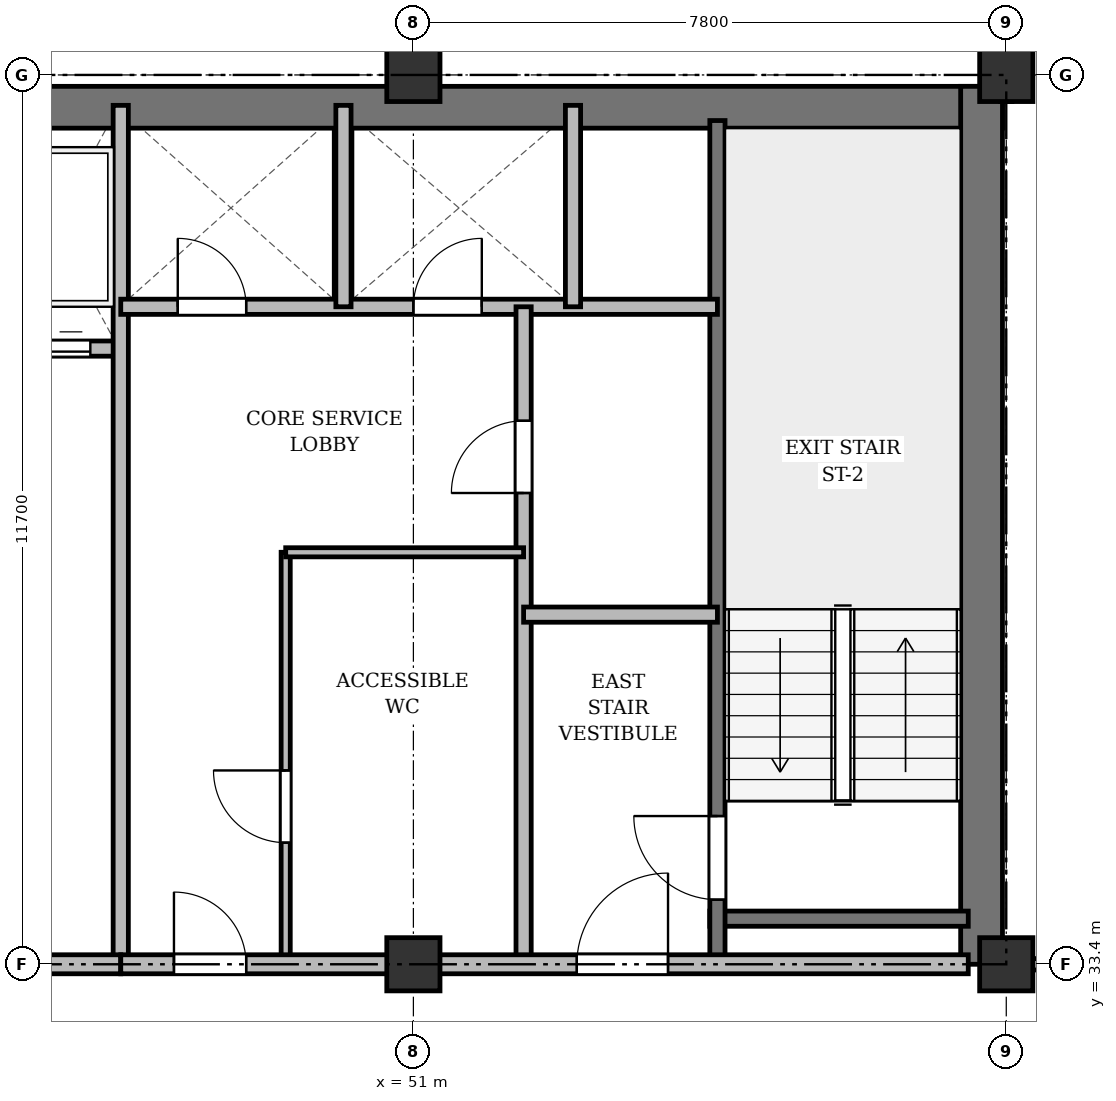
"""IFC4 building model, lengths in metres.
Left out: names, types, materials, properties, quantities, classifications, styles, units other than length and angle.
Written with IfcOpenShell. Run it as: python <this file> out.ifc"""

import sys

from ifc_helpers import new_model, si_unit, direction, frame, frame_2d, origin, origin_2d, place, context, subcontext, project, spatial, rectangle, extrude, source, transform, mapped, element, fill, save


model = new_model("IFC4")
c1 = context("Model", 3, precision=1e-05, world=origin(), true_north=direction((0.0, 1.0)))
c2 = subcontext(c1, "Body", "Model", "MODEL_VIEW")
j1 = project(units=[si_unit("LENGTHUNIT", "METRE"), si_unit("PLANEANGLEUNIT", "RADIAN")], contexts=[c1])
p1 = place(None, origin())
s1 = spatial("IfcSite", under=j1, at=p1, CompositionType="ELEMENT")
p2 = place(p1, origin())
s2 = spatial("IfcBuilding", under=s1, at=p2, CompositionType="ELEMENT")
p3 = place(p2, frame((0.0, 0.0, 215.7)))
s3 = spatial("IfcBuildingStorey", under=s2, at=p3, CompositionType="ELEMENT", Elevation=215.7)
m1 = source(origin(), c2, "Body", "SweptSolid", [
    extrude(rectangle(XDim=0.7, YDim=0.7, at=origin_2d()), origin(), (0.0, 0.0, 1.0), 3.6),
])
for number, where, z_axis, x_axis in (
    (1, (51.0, 33.4, 0.0), (0.0, 0.0, 1.0), (1.0, 0.0, 0.0)),
    (2, (51.0, 45.1, 0.0), (0.0, 0.0, 1.0), (1.0, 0.0, 0.0)),
    (3, (58.8, 33.4, 0.0), (0.0, 0.0, 1.0), (1.0, 0.0, 0.0)),
    (4, (58.8, 45.1, 0.0), (0.0, 0.0, 1.0), (1.0, 0.0, 0.0)),
):
    element("IfcColumn", number, at=place(p3, frame(where, z_axis=z_axis, x_axis=x_axis)), inside=s3, PredefinedType="COLUMN", context=c2, shape_type="MappedRepresentation", body=[
        mapped(m1, transform((0.0, 0.0, 0.0), x_axis=(1.0, 0.0, 0.0), y_axis=(0.0, 1.0, 0.0), z_axis=(0.0, 0.0, 1.0), scale=1.0)),
    ])
p4 = place(p3, frame((15.65, 44.675, 0.0), z_axis=(0.0, 0.0, 1.0), x_axis=(1.0, 0.0, 0.0)))
e5 = element("IfcWall", 5, at=p4, inside=s3, PredefinedType="SHEAR", context=c2, shape_type="SweptSolid", body=[
    extrude(rectangle(XDim=43.1, YDim=0.55, at=frame_2d((21.55, 0.0))), origin(), (0.0, 0.0, 1.0), 3.36),
])
p5 = place(p3, frame((58.475, 33.4, 0.0), z_axis=(0.0, 0.0, 1.0), x_axis=(0.0, 1.0, 0.0)))
e6 = element("IfcWall", 6, at=p5, inside=s3, PredefinedType="SHEAR", context=c2, shape_type="SweptSolid", body=[
    extrude(rectangle(XDim=11.55, YDim=0.55, at=frame_2d((5.775, 0.0))), origin(), (0.0, 0.0, 1.0), 3.36),
])
p6 = place(p3, frame((54.9, 34.0, 0.0), z_axis=(0.0, 0.0, 1.0), x_axis=(1.0, 0.0, 0.0)))
e7 = element("IfcWall", 7, at=p6, inside=s3, PredefinedType="SHEAR", context=c2, shape_type="SweptSolid", body=[
    extrude(rectangle(XDim=3.4, YDim=0.2, at=frame_2d((1.7, 0.0))), origin(), (0.0, 0.0, 1.0), 3.36),
])
p7 = place(p3, frame((55.0, 33.4, 0.0), z_axis=(0.0, 0.0, 1.0), x_axis=(0.0, 1.0, 0.0)))
e8 = element("IfcWall", 8, at=p7, inside=s3, PredefinedType="SHEAR", context=c2, shape_type="SweptSolid", body=[
    extrude(rectangle(XDim=11.1, YDim=0.2, at=frame_2d((5.55, 0.0))), origin(), (0.0, 0.0, 1.0), 3.36),
])
p8 = place(p7, frame((0.85, 0.0, 0.0)))
e9 = element("IfcOpeningElement", 9, at=p8, cuts=e8, PredefinedType="OPENING", context=c2, shape_type="SweptSolid", body=[
    extrude(rectangle(XDim=1.1, YDim=2.15, at=frame_2d((0.55, 1.075))), frame((0.0, 0.11, 0.0), z_axis=(0.0, -1.0, 0.0), x_axis=(1.0, 0.0, 0.0)), (0.0, 0.0, 1.0), 0.22),
])
p9 = place(p3, frame((40.25, 41.5, 0.0), z_axis=(0.0, 0.0, 1.0), x_axis=(1.0, 0.0, 0.0)))
e10 = element("IfcWall", 10, at=p9, inside=s3, PredefinedType="SOLIDWALL", context=c2, shape_type="SweptSolid", body=[
    extrude(rectangle(XDim=6.9, YDim=0.2, at=frame_2d((3.45, 0.0))), origin(), (0.0, 0.0, 1.0), 3.36),
])
p10 = place(p9, frame((0.35, 0.0, 0.0)))
e11 = element("IfcOpeningElement", 11, at=p10, cuts=e10, PredefinedType="OPENING", context=c2, shape_type="SweptSolid", body=[
    extrude(rectangle(XDim=1.05, YDim=2.15, at=frame_2d((0.525, 1.075))), frame((0.0, 0.11, 0.0), z_axis=(0.0, -1.0, 0.0), x_axis=(1.0, 0.0, 0.0)), (0.0, 0.0, 1.0), 0.22),
])
p11 = place(p9, frame((2.05, 0.0, 0.0)))
e12 = element("IfcOpeningElement", 12, at=p11, cuts=e10, PredefinedType="OPENING", context=c2, shape_type="SweptSolid", body=[
    extrude(rectangle(XDim=1.05, YDim=2.15, at=frame_2d((0.525, 1.075))), frame((0.0, 0.11, 0.0), z_axis=(0.0, -1.0, 0.0), x_axis=(1.0, 0.0, 0.0)), (0.0, 0.0, 1.0), 0.22),
])
p12 = place(p9, frame((3.75, 0.0, 0.0)))
e13 = element("IfcOpeningElement", 13, at=p12, cuts=e10, PredefinedType="OPENING", context=c2, shape_type="SweptSolid", body=[
    extrude(rectangle(XDim=1.05, YDim=2.15, at=frame_2d((0.525, 1.075))), frame((0.0, 0.11, 0.0), z_axis=(0.0, -1.0, 0.0), x_axis=(1.0, 0.0, 0.0)), (0.0, 0.0, 1.0), 0.22),
])
p13 = place(p9, frame((5.45, 0.0, 0.0)))
e14 = element("IfcOpeningElement", 14, at=p13, cuts=e10, PredefinedType="OPENING", context=c2, shape_type="SweptSolid", body=[
    extrude(rectangle(XDim=1.05, YDim=2.15, at=frame_2d((0.525, 1.075))), frame((0.0, 0.11, 0.0), z_axis=(0.0, -1.0, 0.0), x_axis=(1.0, 0.0, 0.0)), (0.0, 0.0, 1.0), 0.22),
])
p14 = place(p3, frame((47.15, 33.4, 0.0), z_axis=(0.0, 0.0, 1.0), x_axis=(0.0, 1.0, 0.0)))
e15 = element("IfcWall", 15, at=p14, inside=s3, PredefinedType="SOLIDWALL", context=c2, shape_type="SweptSolid", body=[
    extrude(rectangle(XDim=11.3, YDim=0.2, at=frame_2d((5.65, 0.0))), origin(), (0.0, 0.0, 1.0), 2.91),
])
p15 = place(p3, frame((33.3, 33.4, 0.0), z_axis=(0.0, 0.0, 1.0), x_axis=(1.0, 0.0, 0.0)))
e16 = element("IfcWall", 16, at=p15, inside=s3, PredefinedType="PARTITIONING", context=c2, shape_type="SweptSolid", body=[
    extrude(rectangle(XDim=13.85, YDim=0.25, at=frame_2d((6.925, 0.0))), origin(), (0.0, 0.0, 1.0), 2.91),
])
p16 = place(p15, frame((4.2, 0.0, 0.0)))
e17 = element("IfcOpeningElement", 17, at=p16, cuts=e16, PredefinedType="OPENING", context=c2, shape_type="SweptSolid", body=[
    extrude(rectangle(XDim=1.6, YDim=2.2, at=frame_2d((0.8, 1.1))), frame((0.0, 0.135, 0.0), z_axis=(0.0, -1.0, 0.0), x_axis=(1.0, 0.0, 0.0)), (0.0, 0.0, 1.0), 0.27),
])
p17 = place(p3, frame((47.15, 42.05, 0.0), z_axis=(0.0, 0.0, 1.0), x_axis=(1.0, 0.0, 0.0)))
e18 = element("IfcWall", 18, at=p17, inside=s3, PredefinedType="SOLIDWALL", context=c2, shape_type="SweptSolid", body=[
    extrude(rectangle(XDim=7.85, YDim=0.2, at=frame_2d((3.925, 0.0))), origin(), (0.0, 0.0, 1.0), 2.86),
])
p18 = place(p17, frame((0.75, 0.0, 0.0)))
e19 = element("IfcOpeningElement", 19, at=p18, cuts=e18, PredefinedType="OPENING", context=c2, shape_type="SweptSolid", body=[
    extrude(rectangle(XDim=0.9, YDim=2.1, at=frame_2d((0.45, 1.05))), frame((0.0, 0.11, 0.0), z_axis=(0.0, -1.0, 0.0), x_axis=(1.0, 0.0, 0.0)), (0.0, 0.0, 1.0), 0.22),
])
p19 = place(p17, frame((3.85, 0.0, 0.0)))
e20 = element("IfcOpeningElement", 20, at=p19, cuts=e18, PredefinedType="OPENING", context=c2, shape_type="SweptSolid", body=[
    extrude(rectangle(XDim=0.9, YDim=2.1, at=frame_2d((0.45, 1.05))), frame((0.0, 0.11, 0.0), z_axis=(0.0, -1.0, 0.0), x_axis=(1.0, 0.0, 0.0)), (0.0, 0.0, 1.0), 0.22),
])
for number, where, z_axis, x_axis in (
    (21, (50.08, 42.05, 0.0), (0.0, 0.0, 1.0), (0.0, 1.0, 0.0)),
    (22, (53.1, 42.05, 0.0), (0.0, 0.0, 1.0), (0.0, 1.0, 0.0)),
):
    element("IfcWall", number, at=place(p3, frame(where, z_axis=z_axis, x_axis=x_axis)), inside=s3, PredefinedType="SOLIDWALL", context=c2, shape_type="SweptSolid", body=[
        extrude(rectangle(XDim=2.65, YDim=0.2, at=frame_2d((1.325, 0.0))), origin(), (0.0, 0.0, 1.0), 3.36),
    ])
p20 = place(p3, frame((52.45, 33.4, 0.0), z_axis=(0.0, 0.0, 1.0), x_axis=(0.0, 1.0, 0.0)))
e23 = element("IfcWall", 23, at=p20, inside=s3, PredefinedType="PARTITIONING", context=c2, shape_type="SweptSolid", body=[
    extrude(rectangle(XDim=8.65, YDim=0.2, at=frame_2d((4.325, 0.0))), origin(), (0.0, 0.0, 1.0), 2.91),
])
p21 = place(p20, frame((6.2, 0.0, 0.0)))
e24 = element("IfcOpeningElement", 24, at=p21, cuts=e23, PredefinedType="OPENING", context=c2, shape_type="SweptSolid", body=[
    extrude(rectangle(XDim=0.95, YDim=2.15, at=frame_2d((0.475, 1.075))), frame((0.0, 0.11, 0.0), z_axis=(0.0, -1.0, 0.0), x_axis=(1.0, 0.0, 0.0)), (0.0, 0.0, 1.0), 0.22),
])
p22 = place(p3, frame((52.45, 38.0, 0.0), z_axis=(0.0, 0.0, 1.0), x_axis=(1.0, 0.0, 0.0)))
e25 = element("IfcWall", 25, at=p22, inside=s3, PredefinedType="PARTITIONING", context=c2, shape_type="SweptSolid", body=[
    extrude(rectangle(XDim=2.55, YDim=0.2, at=frame_2d((1.275, 0.0))), origin(), (0.0, 0.0, 1.0), 3.36),
])
p23 = place(p3, frame((49.32, 33.4, 0.0), z_axis=(0.0, 0.0, 1.0), x_axis=(0.0, 1.0, 0.0)))
e26 = element("IfcWall", 26, at=p23, inside=s3, PredefinedType="PARTITIONING", context=c2, shape_type="SweptSolid", body=[
    extrude(rectangle(XDim=5.42, YDim=0.12, at=frame_2d((2.71, 0.0))), origin(), (0.0, 0.0, 1.0), 2.91),
])
p24 = place(p23, frame((1.6, 0.0, 0.0)))
e27 = element("IfcOpeningElement", 27, at=p24, cuts=e26, PredefinedType="OPENING", context=c2, shape_type="SweptSolid", body=[
    extrude(rectangle(XDim=0.95, YDim=2.15, at=frame_2d((0.475, 1.075))), frame((0.0, 0.07, 0.0), z_axis=(0.0, -1.0, 0.0), x_axis=(1.0, 0.0, 0.0)), (0.0, 0.0, 1.0), 0.14),
])
p25 = place(p3, frame((49.32, 38.82, 0.0), z_axis=(0.0, 0.0, 1.0), x_axis=(1.0, 0.0, 0.0)))
e28 = element("IfcWall", 28, at=p25, inside=s3, PredefinedType="PARTITIONING", context=c2, shape_type="SweptSolid", body=[
    extrude(rectangle(XDim=3.13, YDim=0.12, at=frame_2d((1.565, 0.0))), origin(), (0.0, 0.0, 1.0), 2.86),
])
p26 = place(p3, frame((47.15, 33.4, 0.0), z_axis=(0.0, 0.0, 1.0), x_axis=(1.0, 0.0, 0.0)))
e29 = element("IfcWall", 29, at=p26, inside=s3, PredefinedType="PARTITIONING", context=c2, shape_type="SweptSolid", body=[
    extrude(rectangle(XDim=11.15, YDim=0.25, at=frame_2d((5.575, 0.0))), origin(), (0.0, 0.0, 1.0), 2.91),
])
p27 = place(p26, frame((0.7, 0.0, 0.0)))
e30 = element("IfcOpeningElement", 30, at=p27, cuts=e29, PredefinedType="OPENING", context=c2, shape_type="SweptSolid", body=[
    extrude(rectangle(XDim=0.95, YDim=2.15, at=frame_2d((0.475, 1.075))), frame((0.0, 0.135, 0.0), z_axis=(0.0, -1.0, 0.0), x_axis=(1.0, 0.0, 0.0)), (0.0, 0.0, 1.0), 0.27),
])
p28 = place(p26, frame((6.0, 0.0, 0.0)))
e31 = element("IfcOpeningElement", 31, at=p28, cuts=e29, PredefinedType="OPENING", context=c2, shape_type="SweptSolid", body=[
    extrude(rectangle(XDim=1.2, YDim=2.15, at=frame_2d((0.6, 1.075))), frame((0.0, 0.135, 0.0), z_axis=(0.0, -1.0, 0.0), x_axis=(1.0, 0.0, 0.0)), (0.0, 0.0, 1.0), 0.27),
])
p29 = place(p3, frame((58.8, 33.4, 0.0), z_axis=(0.0, 0.0, 1.0), x_axis=(1.0, 0.0, 0.0)))
e32 = element("IfcWall", 32, at=p29, inside=s3, PredefinedType="PARTITIONING", context=c2, shape_type="SweptSolid", body=[
    extrude(rectangle(XDim=7.35, YDim=0.15, at=frame_2d((3.675, 0.0))), origin(), (0.0, 0.0, 1.0), 2.91),
])
p30 = place(p29, frame((3.192, 0.0, 0.0)))
e33 = element("IfcOpeningElement", 33, at=p30, cuts=e32, PredefinedType="OPENING", context=c2, shape_type="SweptSolid", body=[
    extrude(rectangle(XDim=0.95, YDim=2.15, at=frame_2d((0.475, 1.075))), frame((0.0, 0.085, 0.0), z_axis=(0.0, -1.0, 0.0), x_axis=(1.0, 0.0, 0.0)), (0.0, 0.0, 1.0), 0.17),
])
p31 = place(p3, frame((58.8, 44.75, 0.0), z_axis=(0.0, 0.0, 1.0), x_axis=(0.0, 1.0, 0.0)))
e34 = element("IfcWall", 34, at=p31, inside=s3, PredefinedType="PARTITIONING", context=c2, shape_type="SweptSolid", body=[
    extrude(rectangle(XDim=3.61, YDim=0.15, at=frame_2d((1.805, 0.0))), origin(), (0.0, 0.0, 1.0), 2.86),
])
p32 = place(p31, frame((1.1, 0.0, 0.0)))
e35 = element("IfcOpeningElement", 35, at=p32, cuts=e34, PredefinedType="OPENING", context=c2, shape_type="SweptSolid", body=[
    extrude(rectangle(XDim=0.95, YDim=2.15, at=frame_2d((0.475, 1.075))), frame((0.0, 0.085, 0.0), z_axis=(0.0, -1.0, 0.0), x_axis=(1.0, 0.0, 0.0)), (0.0, 0.0, 1.0), 0.17),
])
m2 = source(origin(), c2, "Body", "SweptSolid", [
    extrude(rectangle(XDim=1.1, YDim=2.15, at=frame_2d((0.55, 1.075))), frame((0.0, 0.025, 0.0), z_axis=(0.0, -1.0, 0.0), x_axis=(1.0, 0.0, 0.0)), (0.0, 0.0, 1.0), 0.05),
])
p33 = place(p8, origin())
e36 = element("IfcDoor", 36, at=p33, inside=s3, OperationType="SINGLE_SWING_RIGHT", PredefinedType="DOOR", context=c2, shape_type="MappedRepresentation", body=[
    mapped(m2, transform((0.0, 0.0, 0.0), x_axis=(1.0, 0.0, 0.0), y_axis=(0.0, 1.0, 0.0), z_axis=(0.0, 0.0, 1.0), scale=1.0)),
])
fill(e9, e36)
m3 = source(origin(), c2, "Body", "SweptSolid", [
    extrude(rectangle(XDim=1.05, YDim=2.15, at=frame_2d((0.525, 1.075))), frame((0.0, 0.025, 0.0), z_axis=(0.0, -1.0, 0.0), x_axis=(1.0, 0.0, 0.0)), (0.0, 0.0, 1.0), 0.05),
])
p34 = place(p13, origin())
e37 = element("IfcDoor", 37, at=p34, inside=s3, OperationType="DOUBLE_DOOR_SLIDING", PredefinedType="DOOR", context=c2, shape_type="MappedRepresentation", body=[
    mapped(m3, transform((0.0, 0.0, 0.0), x_axis=(1.0, 0.0, 0.0), y_axis=(0.0, 1.0, 0.0), z_axis=(0.0, 0.0, 1.0), scale=1.0)),
])
fill(e14, e37)
m4 = source(origin(), c2, "Body", "SweptSolid", [
    extrude(rectangle(XDim=0.9, YDim=2.1, at=frame_2d((0.45, 1.05))), frame((0.0, 0.025, 0.0), z_axis=(0.0, -1.0, 0.0), x_axis=(1.0, 0.0, 0.0)), (0.0, 0.0, 1.0), 0.05),
])
p35 = place(p18, origin())
e38 = element("IfcDoor", 38, at=p35, inside=s3, OperationType="SINGLE_SWING_LEFT", PredefinedType="DOOR", context=c2, shape_type="MappedRepresentation", body=[
    mapped(m4, transform((0.0, 0.0, 0.0), x_axis=(1.0, 0.0, 0.0), y_axis=(0.0, 1.0, 0.0), z_axis=(0.0, 0.0, 1.0), scale=1.0)),
])
fill(e19, e38)
p36 = place(p19, origin())
e39 = element("IfcDoor", 39, at=p36, inside=s3, OperationType="SINGLE_SWING_RIGHT", PredefinedType="DOOR", context=c2, shape_type="MappedRepresentation", body=[
    mapped(m4, transform((0.0, 0.0, 0.0), x_axis=(1.0, 0.0, 0.0), y_axis=(0.0, 1.0, 0.0), z_axis=(0.0, 0.0, 1.0), scale=1.0)),
])
fill(e20, e39)
m5 = source(origin(), c2, "Body", "SweptSolid", [
    extrude(rectangle(XDim=0.95, YDim=2.15, at=frame_2d((0.475, 1.075))), frame((0.0, 0.025, 0.0), z_axis=(0.0, -1.0, 0.0), x_axis=(1.0, 0.0, 0.0)), (0.0, 0.0, 1.0), 0.05),
])
p37 = place(p21, origin())
e40 = element("IfcDoor", 40, at=p37, inside=s3, OperationType="SINGLE_SWING_LEFT", PredefinedType="DOOR", context=c2, shape_type="MappedRepresentation", body=[
    mapped(m5, transform((0.0, 0.0, 0.0), x_axis=(1.0, 0.0, 0.0), y_axis=(0.0, 1.0, 0.0), z_axis=(0.0, 0.0, 1.0), scale=1.0)),
])
fill(e24, e40)
p38 = place(p24, origin())
e41 = element("IfcDoor", 41, at=p38, inside=s3, OperationType="SINGLE_SWING_RIGHT", PredefinedType="DOOR", context=c2, shape_type="MappedRepresentation", body=[
    mapped(m5, transform((0.0, 0.0, 0.0), x_axis=(1.0, 0.0, 0.0), y_axis=(0.0, 1.0, 0.0), z_axis=(0.0, 0.0, 1.0), scale=1.0)),
])
fill(e27, e41)
p39 = place(p27, origin())
e42 = element("IfcDoor", 42, at=p39, inside=s3, OperationType="SINGLE_SWING_LEFT", PredefinedType="DOOR", context=c2, shape_type="MappedRepresentation", body=[
    mapped(m5, transform((0.0, 0.0, 0.0), x_axis=(1.0, 0.0, 0.0), y_axis=(0.0, 1.0, 0.0), z_axis=(0.0, 0.0, 1.0), scale=1.0)),
])
fill(e30, e42)
m6 = source(origin(), c2, "Body", "SweptSolid", [
    extrude(rectangle(XDim=1.2, YDim=2.15, at=frame_2d((0.6, 1.075))), frame((0.0, 0.025, 0.0), z_axis=(0.0, -1.0, 0.0), x_axis=(1.0, 0.0, 0.0)), (0.0, 0.0, 1.0), 0.05),
])
p40 = place(p28, origin())
e43 = element("IfcDoor", 43, at=p40, inside=s3, OperationType="SINGLE_SWING_RIGHT", PredefinedType="DOOR", context=c2, shape_type="MappedRepresentation", body=[
    mapped(m6, transform((0.0, 0.0, 0.0), x_axis=(1.0, 0.0, 0.0), y_axis=(0.0, 1.0, 0.0), z_axis=(0.0, 0.0, 1.0), scale=1.0)),
])
fill(e31, e43)
save(model, sys.argv[1])
